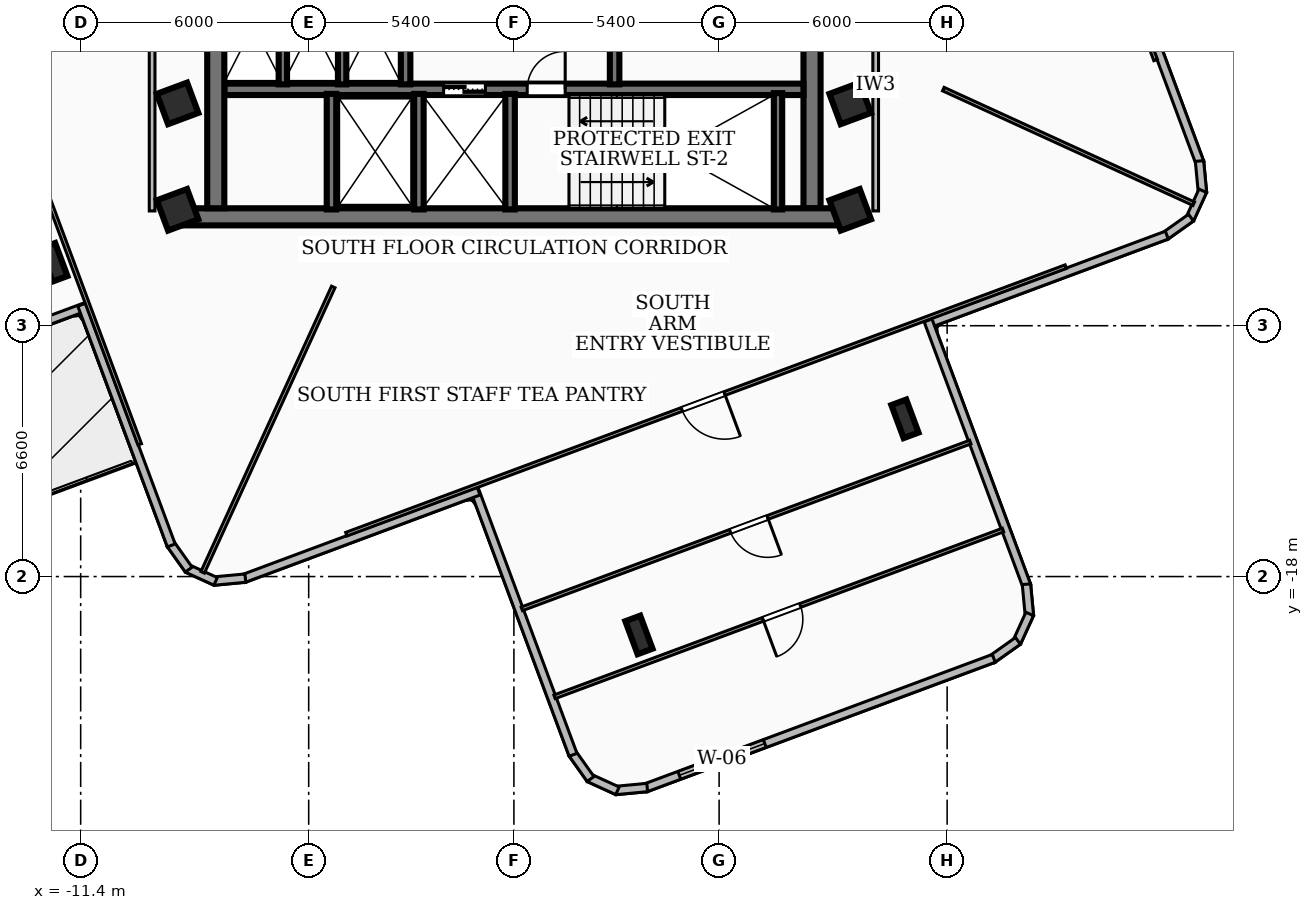
"""IFC4 building model, lengths in metres.
Left out: names, types, materials, properties, quantities, classifications, styles, units other than length and angle.
Written with IfcOpenShell. Run it as: python <this file> out.ifc"""

import sys

from ifc_helpers import new_model, si_unit, direction, frame, frame_2d, origin, origin_2d, place, context, subcontext, project, spatial, rectangle, i_section, extrude, element, fill, save


model = new_model("IFC4")
c1 = context("Model", 3, precision=1e-05, world=origin(), true_north=direction((0.0, 1.0)))
c2 = subcontext(c1, "Body", "Model", "MODEL_VIEW")
j1 = project(units=[si_unit("LENGTHUNIT", "METRE"), si_unit("PLANEANGLEUNIT", "RADIAN")], contexts=[c1])
p1 = place(None, origin())
s1 = spatial("IfcSite", under=j1, at=p1, CompositionType="ELEMENT")
p2 = place(p1, origin())
s2 = spatial("IfcBuilding", under=s1, at=p2, CompositionType="ELEMENT")
p3 = place(p2, frame((0.0, 0.0, 166.68)))
s3 = spatial("IfcBuildingStorey", under=s2, at=p3, CompositionType="ELEMENT", Elevation=166.68)
p4 = place(p3, frame((8.78, -8.535, 0.0), z_axis=(0.0, 0.0, 1.0), x_axis=(-1.0, 0.0, 0.0)))
e1 = element("IfcWall", 1, at=p4, inside=s3, PredefinedType="SHEAR", context=c2, shape_type="SweptSolid", body=[
    extrude(rectangle(XDim=17.56, YDim=0.45, at=frame_2d((8.78, 0.0))), origin(), (0.0, 0.0, 1.0), 3.34),
])
for number, where, z_axis, x_axis in (
    (2, (-7.845, -8.31, 0.0), (0.0, 0.0, 1.0), (0.0, 1.0, 0.0)),
    (3, (7.845, -1.975, 0.0), (0.0, 0.0, 1.0), (0.0, -1.0, 0.0)),
):
    element("IfcWall", number, at=place(p3, frame(where, z_axis=z_axis, x_axis=x_axis)), inside=s3, PredefinedType="SHEAR", context=c2, shape_type="SweptSolid", body=[
        extrude(rectangle(XDim=6.335, YDim=0.45, at=frame_2d((3.167, 0.0))), origin(), (0.0, 0.0, 1.0), 3.34),
    ])
p5 = place(p3, frame((-7.62, -5.18, 0.0), z_axis=(0.0, 0.0, 1.0), x_axis=(1.0, 0.0, 0.0)))
e4 = element("IfcWall", 4, at=p5, inside=s3, PredefinedType="SOLIDWALL", context=c2, shape_type="SweptSolid", body=[
    extrude(rectangle(XDim=15.24, YDim=0.3, at=frame_2d((7.62, 0.0))), origin(), (0.0, 0.0, 1.0), 3.34),
])
p6 = place(p5, frame((5.77, 0.0, 0.0)))
e5 = element("IfcOpeningElement", 5, at=p6, cuts=e4, PredefinedType="OPENING", context=c2, shape_type="SweptSolid", body=[
    extrude(rectangle(XDim=1.1, YDim=2.15, at=frame_2d((0.55, 1.075))), frame((0.0, 0.16, 0.0), z_axis=(0.0, -1.0, 0.0), x_axis=(1.0, 0.0, 0.0)), (0.0, 0.0, 1.0), 0.32),
])
p7 = place(p5, frame((7.97, 0.0, 0.0)))
e6 = element("IfcOpeningElement", 6, at=p7, cuts=e4, PredefinedType="OPENING", context=c2, shape_type="SweptSolid", body=[
    extrude(rectangle(XDim=1.0, YDim=2.1, at=frame_2d((0.5, 1.05))), frame((0.0, 0.16, 0.0), z_axis=(0.0, -1.0, 0.0), x_axis=(1.0, 0.0, 0.0)), (0.0, 0.0, 1.0), 0.32),
])
p8 = place(p3, frame((6.95, -8.34, 0.0), z_axis=(0.0, 0.0, 1.0), x_axis=(0.0, 1.0, 0.0)))
e7 = element("IfcWall", 7, at=p8, inside=s3, PredefinedType="SOLIDWALL", context=c2, shape_type="SweptSolid", body=[
    extrude(rectangle(XDim=3.06, YDim=0.22, at=frame_2d((1.53, 0.0))), origin(), (0.0, 0.0, 1.0), 3.34),
])
for number, where, z_axis, x_axis in (
    (8, (-0.1, -8.34, 0.0), (0.0, 0.0, 1.0), (0.0, 1.0, 0.0)),
    (9, (-2.5, -8.34, 0.0), (0.0, 0.0, 1.0), (0.0, 1.0, 0.0)),
    (10, (-4.8, -8.34, 0.0), (0.0, 0.0, 1.0), (0.0, 1.0, 0.0)),
):
    element("IfcWall", number, at=place(p3, frame(where, z_axis=z_axis, x_axis=x_axis)), inside=s3, PredefinedType="SOLIDWALL", context=c2, shape_type="SweptSolid", body=[
        extrude(rectangle(XDim=3.04, YDim=0.25, at=frame_2d((1.52, 0.0))), origin(), (0.0, 0.0, 1.0), 3.34),
    ])
for number, where, z_axis, x_axis in (
    (11, (-2.85, -5.05, 0.0), (0.0, 0.0, 1.0), (0.0, 1.0, 0.0)),
    (12, (2.65, -5.05, 0.0), (0.0, 0.0, 1.0), (0.0, 1.0, 0.0)),
):
    element("IfcWall", number, at=place(p3, frame(where, z_axis=z_axis, x_axis=x_axis)), inside=s3, PredefinedType="SOLIDWALL", context=c2, shape_type="SweptSolid", body=[
        extrude(rectangle(XDim=3.07, YDim=0.25, at=frame_2d((1.535, 0.0))), origin(), (0.0, 0.0, 1.0), 3.34),
    ])
for number, where, z_axis, x_axis in (
    (13, (-6.08, -5.05, 0.0), (0.0, 0.0, 1.0), (0.0, 1.0, 0.0)),
    (14, (-4.52, -5.05, 0.0), (0.0, 0.0, 1.0), (0.0, 1.0, 0.0)),
):
    element("IfcWall", number, at=place(p3, frame(where, z_axis=z_axis, x_axis=x_axis)), inside=s3, PredefinedType="SOLIDWALL", context=c2, shape_type="SweptSolid", body=[
        extrude(rectangle(XDim=3.07, YDim=0.22, at=frame_2d((1.535, 0.0))), origin(), (0.0, 0.0, 1.0), 3.34),
    ])
for number, where, z_axis, x_axis in (
    (15, (-8.85, -5.55, 0.0), (0.0, 0.0, 1.0), (0.937, 0.349, 0.0)),
    (16, (8.85, -5.55, 0.0), (0.0, 0.0, 1.0), (0.937, 0.349, 0.0)),
    (17, (8.85, -8.35, 0.0), (0.0, 0.0, 1.0), (0.937, 0.349, 0.0)),
    (18, (-8.85, -8.35, 0.0), (0.0, 0.0, 1.0), (0.937, 0.349, 0.0)),
):
    element("IfcColumn", number, at=place(p3, frame(where, z_axis=z_axis, x_axis=x_axis)), inside=s3, PredefinedType="COLUMN", context=c2, shape_type="SweptSolid", body=[
        extrude(rectangle(XDim=0.85, YDim=0.85, at=origin_2d()), origin(), (0.0, 0.0, 1.0), 3.6),
    ])
for number, where, z_axis, x_axis in (
    (19, (-12.106, -9.731, 0.0), (0.0, 0.0, 1.0), (0.937, 0.349, 0.0)),
    (20, (3.29, -19.536, 0.0), (0.0, 0.0, 1.0), (0.937, 0.349, 0.0)),
    (21, (10.29, -13.85, 0.0), (0.0, 0.0, 1.0), (0.937, 0.349, 0.0)),
):
    element("IfcColumn", number, at=place(p3, frame(where, z_axis=z_axis, x_axis=x_axis)), inside=s3, PredefinedType="COLUMN", context=c2, shape_type="SweptSolid", body=[
        extrude(i_section(OverallWidth=0.418, OverallDepth=0.927, WebThickness=0.019, FlangeThickness=0.032, at=origin_2d()), origin(), (0.0, 0.0, 1.0), 3.6),
    ])
p9 = place(p3, frame((-11.26, -10.898, 0.0), z_axis=(0.0, 0.0, 1.0), x_axis=(-0.937248687931, -0.348661579431, 0.0)))
e22 = element("IfcWall", 22, at=p9, inside=s3, PredefinedType="SOLIDWALL", context=c2, shape_type="SweptSolid", body=[
    extrude(rectangle(XDim=9.057, YDim=0.22, at=frame_2d((4.529, 0.0))), origin(), (0.0, 0.0, 1.0), 2.72),
])
p10 = place(p9, frame((4.4, 0.0, 0.0)))
e23 = element("IfcOpeningElement", 23, at=p10, cuts=e22, PredefinedType="OPENING", context=c2, shape_type="SweptSolid", body=[
    extrude(rectangle(XDim=1.1, YDim=2.1, at=frame_2d((0.55, 1.05))), frame((0.0, 0.12, 0.0), z_axis=(0.0, -1.0, 0.0), x_axis=(1.0, 0.0, 0.0)), (0.0, 0.0, 1.0), 0.24),
])
p11 = place(p3, frame((15.751, -0.93, 0.0), z_axis=(0.0, 0.0, 1.0), x_axis=(0.348729932868, -0.937223257246, 0.0)))
e24 = element("IfcWall", 24, at=p11, inside=s3, PredefinedType="SOLIDWALL", context=c2, shape_type="SweptSolid", body=[
    extrude(rectangle(XDim=6.598, YDim=0.22, at=frame_2d((3.299, 0.0))), origin(), (0.0, 0.0, 1.0), 3.34),
])
p12 = place(p3, frame((18.041, -7.066, 0.0), z_axis=(0.0, 0.0, 1.0), x_axis=(0.09330446586, -0.995637623159, 0.0)))
e25 = element("IfcWall", 25, at=p12, inside=s3, PredefinedType="SOLIDWALL", context=c2, shape_type="SweptSolid", body=[
    extrude(rectangle(XDim=0.835, YDim=0.22, at=frame_2d((0.417, 0.0))), origin(), (0.0, 0.0, 1.0), 3.34),
])
p13 = place(p3, frame((18.127, -7.849, 0.0), z_axis=(0.0, 0.0, 1.0), x_axis=(-0.415083126143, -0.909783489843, 0.0)))
e26 = element("IfcWall", 26, at=p13, inside=s3, PredefinedType="SOLIDWALL", context=c2, shape_type="SweptSolid", body=[
    extrude(rectangle(XDim=0.819, YDim=0.22, at=frame_2d((0.409, 0.0))), origin(), (0.0, 0.0, 1.0), 3.34),
])
p14 = place(p3, frame((17.817, -8.557, 0.0), z_axis=(0.0, 0.0, 1.0), x_axis=(-0.815315167698, -0.579017424022, 0.0)))
e27 = element("IfcWall", 27, at=p14, inside=s3, PredefinedType="SOLIDWALL", context=c2, shape_type="SweptSolid", body=[
    extrude(rectangle(XDim=0.833, YDim=0.22, at=frame_2d((0.417, 0.0))), origin(), (0.0, 0.0, 1.0), 3.34),
])
p15 = place(p3, frame((17.181, -9.016, 0.0), z_axis=(0.0, 0.0, 1.0), x_axis=(-0.937216908499, -0.34874699486, 0.0)))
e28 = element("IfcWall", 28, at=p15, inside=s3, PredefinedType="SOLIDWALL", context=c2, shape_type="SweptSolid", body=[
    extrude(rectangle(XDim=6.758, YDim=0.22, at=frame_2d((3.379, 0.0))), origin(), (0.0, 0.0, 1.0), 3.34),
])
p16 = place(p3, frame((10.898, -11.26, 0.0), z_axis=(0.0, 0.0, 1.0), x_axis=(0.348636078187, -0.937258174137, 0.0)))
e29 = element("IfcWall", 29, at=p16, inside=s3, PredefinedType="SOLIDWALL", context=c2, shape_type="SweptSolid", body=[
    extrude(rectangle(XDim=7.458, YDim=0.22, at=frame_2d((3.729, 0.0))), origin(), (0.0, 0.0, 1.0), 3.34),
])
p17 = place(p3, frame((13.487, -18.202, 0.0), z_axis=(0.0, 0.0, 1.0), x_axis=(0.093413278521, -0.99562741997, 0.0)))
e30 = element("IfcWall", 30, at=p17, inside=s3, PredefinedType="SOLIDWALL", context=c2, shape_type="SweptSolid", body=[
    extrude(rectangle(XDim=0.834, YDim=0.22, at=frame_2d((0.417, 0.0))), origin(), (0.0, 0.0, 1.0), 3.34),
])
p18 = place(p3, frame((13.573, -18.984, 0.0), z_axis=(0.0, 0.0, 1.0), x_axis=(-0.41476734413, -0.909927497245, 0.0)))
e31 = element("IfcWall", 31, at=p18, inside=s3, PredefinedType="SOLIDWALL", context=c2, shape_type="SweptSolid", body=[
    extrude(rectangle(XDim=0.82, YDim=0.22, at=frame_2d((0.41, 0.0))), origin(), (0.0, 0.0, 1.0), 3.34),
])
p19 = place(p3, frame((13.263, -19.693, 0.0), z_axis=(0.0, 0.0, 1.0), x_axis=(-0.815453569677, -0.578822490666, 0.0)))
e32 = element("IfcWall", 32, at=p19, inside=s3, PredefinedType="SOLIDWALL", context=c2, shape_type="SweptSolid", body=[
    extrude(rectangle(XDim=0.833, YDim=0.22, at=frame_2d((0.416, 0.0))), origin(), (0.0, 0.0, 1.0), 3.34),
])
p20 = place(p3, frame((12.627, -20.152, 0.0), z_axis=(0.0, 0.0, 1.0), x_axis=(-0.937257326037, -0.348638358175, 0.0)))
e33 = element("IfcWall", 33, at=p20, inside=s3, PredefinedType="SOLIDWALL", context=c2, shape_type="SweptSolid", body=[
    extrude(rectangle(XDim=9.781, YDim=0.22, at=frame_2d((4.89, 0.0))), origin(), (0.0, 0.0, 1.0), 3.34),
])
p21 = place(p20, frame((6.429, 0.0, 0.85)))
e34 = element("IfcOpeningElement", 34, at=p21, cuts=e33, PredefinedType="OPENING", context=c2, shape_type="SweptSolid", body=[
    extrude(rectangle(XDim=2.4, YDim=1.85, at=frame_2d((1.2, 0.925))), frame((0.0, 0.12, 0.0), z_axis=(0.0, -1.0, 0.0), x_axis=(1.0, 0.0, 0.0)), (0.0, 0.0, 1.0), 0.24),
])
p22 = place(p3, frame((3.508, -23.551, 0.0), z_axis=(0.0, 0.0, 1.0), x_axis=(-0.995637623159, -0.09330446586, 0.0)))
e35 = element("IfcWall", 35, at=p22, inside=s3, PredefinedType="SOLIDWALL", context=c2, shape_type="SweptSolid", body=[
    extrude(rectangle(XDim=0.835, YDim=0.22, at=frame_2d((0.417, 0.0))), origin(), (0.0, 0.0, 1.0), 3.34),
])
p23 = place(p3, frame((2.725, -23.637, 0.0), z_axis=(0.0, 0.0, 1.0), x_axis=(-0.909834845619, 0.414970545577, 0.0)))
e36 = element("IfcWall", 36, at=p23, inside=s3, PredefinedType="SOLIDWALL", context=c2, shape_type="SweptSolid", body=[
    extrude(rectangle(XDim=0.819, YDim=0.22, at=frame_2d((0.409, 0.0))), origin(), (0.0, 0.0, 1.0), 3.34),
])
p24 = place(p3, frame((2.017, -23.327, 0.0), z_axis=(0.0, 0.0, 1.0), x_axis=(-0.579242960811, 0.815154949903, 0.0)))
e37 = element("IfcWall", 37, at=p24, inside=s3, PredefinedType="SOLIDWALL", context=c2, shape_type="SweptSolid", body=[
    extrude(rectangle(XDim=0.834, YDim=0.22, at=frame_2d((0.417, 0.0))), origin(), (0.0, 0.0, 1.0), 3.34),
])
p25 = place(p3, frame((1.557, -22.69, 0.0), z_axis=(0.0, 0.0, 1.0), x_axis=(-0.348607320852, 0.937268870628, 0.0)))
e38 = element("IfcWall", 38, at=p25, inside=s3, PredefinedType="SOLIDWALL", context=c2, shape_type="SweptSolid", body=[
    extrude(rectangle(XDim=7.458, YDim=0.22, at=frame_2d((3.729, 0.0))), origin(), (0.0, 0.0, 1.0), 2.644),
])
p26 = place(p3, frame((-0.93, -15.751, 0.0), z_axis=(0.0, 0.0, 1.0), x_axis=(-0.937223257246, -0.348729932868, 0.0)))
e39 = element("IfcWall", 39, at=p26, inside=s3, PredefinedType="SOLIDWALL", context=c2, shape_type="SweptSolid", body=[
    extrude(rectangle(XDim=6.598, YDim=0.22, at=frame_2d((3.299, 0.0))), origin(), (0.0, 0.0, 1.0), 2.644),
])
p27 = place(p3, frame((-7.066, -18.041, 0.0), z_axis=(0.0, 0.0, 1.0), x_axis=(-0.995637623159, -0.09330446586, 0.0)))
e40 = element("IfcWall", 40, at=p27, inside=s3, PredefinedType="SOLIDWALL", context=c2, shape_type="SweptSolid", body=[
    extrude(rectangle(XDim=0.835, YDim=0.22, at=frame_2d((0.417, 0.0))), origin(), (0.0, 0.0, 1.0), 3.34),
])
p28 = place(p3, frame((-7.849, -18.127, 0.0), z_axis=(0.0, 0.0, 1.0), x_axis=(-0.909783489843, 0.415083126143, 0.0)))
e41 = element("IfcWall", 41, at=p28, inside=s3, PredefinedType="SOLIDWALL", context=c2, shape_type="SweptSolid", body=[
    extrude(rectangle(XDim=0.819, YDim=0.22, at=frame_2d((0.409, 0.0))), origin(), (0.0, 0.0, 1.0), 3.34),
])
p29 = place(p3, frame((-8.557, -17.817, 0.0), z_axis=(0.0, 0.0, 1.0), x_axis=(-0.579017424022, 0.815315167698, 0.0)))
e42 = element("IfcWall", 42, at=p29, inside=s3, PredefinedType="SOLIDWALL", context=c2, shape_type="SweptSolid", body=[
    extrude(rectangle(XDim=0.833, YDim=0.22, at=frame_2d((0.417, 0.0))), origin(), (0.0, 0.0, 1.0), 3.34),
])
p30 = place(p3, frame((-9.016, -17.181, 0.0), z_axis=(0.0, 0.0, 1.0), x_axis=(-0.34874699486, 0.937216908499, 0.0)))
e43 = element("IfcWall", 43, at=p30, inside=s3, PredefinedType="SOLIDWALL", context=c2, shape_type="SweptSolid", body=[
    extrude(rectangle(XDim=6.758, YDim=0.22, at=frame_2d((3.379, 0.0))), origin(), (0.0, 0.0, 1.0), 2.72),
])
p31 = place(p3, frame((-9.52, -8.38, 0.0), z_axis=(0.0, 0.0, 1.0), x_axis=(0.0, 1.0, 0.0)))
e44 = element("IfcWall", 44, at=p31, inside=s3, PredefinedType="PARTITIONING", context=c2, shape_type="SweptSolid", body=[
    extrude(rectangle(XDim=6.63, YDim=0.15, at=frame_2d((3.315, 0.0))), origin(), (0.0, 0.0, 1.0), 2.644),
])
p32 = place(p3, frame((9.52, -8.38, 0.0), z_axis=(0.0, 0.0, 1.0), x_axis=(0.0, 1.0, 0.0)))
e45 = element("IfcWall", 45, at=p32, inside=s3, PredefinedType="PARTITIONING", context=c2, shape_type="SweptSolid", body=[
    extrude(rectangle(XDim=6.63, YDim=0.15, at=frame_2d((3.315, 0.0))), origin(), (0.0, 0.0, 1.0), 3.34),
])
p33 = place(p3, frame((-4.753, -10.38, 0.0), z_axis=(0.0, 0.0, 1.0), x_axis=(-0.416191484634, -0.909276991966, 0.0)))
e46 = element("IfcWall", 46, at=p33, inside=s3, PredefinedType="PARTITIONING", context=c2, shape_type="SweptSolid", body=[
    extrude(rectangle(XDim=8.258, YDim=0.1, at=frame_2d((4.129, 0.0))), origin(), (0.0, 0.0, 1.0), 2.644),
])
p34 = place(p3, frame((11.3, -5.174, 0.0), z_axis=(0.0, 0.0, 1.0), x_axis=(0.909275268701, -0.416195249528, 0.0)))
e47 = element("IfcWall", 47, at=p34, inside=s3, PredefinedType="PARTITIONING", context=c2, shape_type="SweptSolid", body=[
    extrude(rectangle(XDim=7.246, YDim=0.1, at=frame_2d((3.623, 0.0))), origin(), (0.0, 0.0, 1.0), 3.34),
])
p35 = place(p3, frame((9.846, 14.522, 0.0), z_axis=(0.0, 0.0, 1.0), x_axis=(0.348543090668, -0.937292757866, 0.0)))
e48 = element("IfcWall", 48, at=p35, inside=s3, PredefinedType="PARTITIONING", context=c2, shape_type="SweptSolid", body=[
    extrude(rectangle(XDim=20.198, YDim=0.1, at=frame_2d((10.099, 0.0))), origin(), (0.0, 0.0, 1.0), 2.644),
])
p36 = place(p35, frame((9.579, 0.0, 0.0)))
e49 = element("IfcOpeningElement", 49, at=p36, cuts=e48, PredefinedType="OPENING", context=c2, shape_type="SweptSolid", body=[
    extrude(rectangle(XDim=1.2, YDim=2.1, at=frame_2d((0.6, 1.05))), frame((0.0, 0.06, 0.0), z_axis=(0.0, -1.0, 0.0), x_axis=(1.0, 0.0, 0.0)), (0.0, 0.0, 1.0), 0.12),
])
p37 = place(p3, frame((-9.846, -14.522, 0.0), z_axis=(0.0, 0.0, 1.0), x_axis=(-0.348543090668, 0.937292757866, 0.0)))
e50 = element("IfcWall", 50, at=p37, inside=s3, PredefinedType="PARTITIONING", context=c2, shape_type="SweptSolid", body=[
    extrude(rectangle(XDim=20.198, YDim=0.1, at=frame_2d((10.099, 0.0))), origin(), (0.0, 0.0, 1.0), 2.644),
])
p38 = place(p37, frame((9.579, 0.0, 0.0)))
e51 = element("IfcOpeningElement", 51, at=p38, cuts=e50, PredefinedType="OPENING", context=c2, shape_type="SweptSolid", body=[
    extrude(rectangle(XDim=1.2, YDim=2.1, at=frame_2d((0.6, 1.05))), frame((0.0, 0.06, 0.0), z_axis=(0.0, -1.0, 0.0), x_axis=(1.0, 0.0, 0.0)), (0.0, 0.0, 1.0), 0.12),
])
p39 = place(p3, frame((14.522, -9.846, 0.0), z_axis=(0.0, 0.0, 1.0), x_axis=(-0.937292757866, -0.348543090668, 0.0)))
e52 = element("IfcWall", 52, at=p39, inside=s3, PredefinedType="PARTITIONING", context=c2, shape_type="SweptSolid", body=[
    extrude(rectangle(XDim=20.198, YDim=0.1, at=frame_2d((10.099, 0.0))), origin(), (0.0, 0.0, 1.0), 2.644),
])
p40 = place(p39, frame((9.579, 0.0, 0.0)))
e53 = element("IfcOpeningElement", 53, at=p40, cuts=e52, PredefinedType="OPENING", context=c2, shape_type="SweptSolid", body=[
    extrude(rectangle(XDim=1.2, YDim=2.1, at=frame_2d((0.6, 1.05))), frame((0.0, 0.06, 0.0), z_axis=(0.0, -1.0, 0.0), x_axis=(1.0, 0.0, 0.0)), (0.0, 0.0, 1.0), 0.12),
])
p41 = place(p3, frame((12.009, -14.461, 0.0), z_axis=(0.0, 0.0, 1.0), x_axis=(-0.937262231235, -0.348625171066, 0.0)))
e54 = element("IfcWall", 54, at=p41, inside=s3, PredefinedType="PARTITIONING", context=c2, shape_type="SweptSolid", body=[
    extrude(rectangle(XDim=12.59, YDim=0.1, at=frame_2d((6.295, 0.0))), origin(), (0.0, 0.0, 1.0), 2.644),
])
p42 = place(p41, frame((5.69, 0.0, 0.0)))
e55 = element("IfcOpeningElement", 55, at=p42, cuts=e54, PredefinedType="OPENING", context=c2, shape_type="SweptSolid", body=[
    extrude(rectangle(XDim=1.05, YDim=2.08, at=frame_2d((0.525, 1.04))), frame((0.0, 0.06, 0.0), z_axis=(0.0, -1.0, 0.0), x_axis=(1.0, 0.0, 0.0)), (0.0, 0.0, 1.0), 0.12),
])
p43 = place(p3, frame((12.87, -16.776, 0.0), z_axis=(0.0, 0.0, 1.0), x_axis=(-0.937262231235, -0.348625171066, 0.0)))
e56 = element("IfcWall", 56, at=p43, inside=s3, PredefinedType="PARTITIONING", context=c2, shape_type="SweptSolid", body=[
    extrude(rectangle(XDim=12.59, YDim=0.1, at=frame_2d((6.295, 0.0))), origin(), (0.0, 0.0, 1.0), 3.34),
])
p44 = place(p43, frame((5.69, 0.0, 0.0)))
e57 = element("IfcOpeningElement", 57, at=p44, cuts=e56, PredefinedType="OPENING", context=c2, shape_type="SweptSolid", body=[
    extrude(rectangle(XDim=1.05, YDim=2.08, at=frame_2d((0.525, 1.04))), frame((0.0, 0.06, 0.0), z_axis=(0.0, -1.0, 0.0), x_axis=(1.0, 0.0, 0.0)), (0.0, 0.0, 1.0), 0.12),
])
p45 = place(p21, origin())
e58 = element("IfcWindow", 58, at=p45, inside=s3, PartitioningType="SINGLE_PANEL", PredefinedType="WINDOW", context=c2, shape_type="SweptSolid", body=[
    extrude(rectangle(XDim=2.4, YDim=1.85, at=frame_2d((1.2, 0.925))), frame((0.0, 0.03, 0.0), z_axis=(0.0, -1.0, 0.0), x_axis=(1.0, 0.0, 0.0)), (0.0, 0.0, 1.0), 0.06),
])
fill(e34, e58)
p46 = place(p6, origin())
e59 = element("IfcDoor", 59, at=p46, inside=s3, OperationType="DOUBLE_DOOR_SLIDING", PredefinedType="DOOR", context=c2, shape_type="SweptSolid", body=[
    extrude(rectangle(XDim=1.1, YDim=2.15, at=frame_2d((0.55, 1.075))), frame((0.0, 0.025, 0.0), z_axis=(0.0, -1.0, 0.0), x_axis=(1.0, 0.0, 0.0)), (0.0, 0.0, 1.0), 0.05),
])
fill(e5, e59)
p47 = place(p7, origin())
e60 = element("IfcDoor", 60, at=p47, inside=s3, OperationType="SINGLE_SWING_RIGHT", PredefinedType="DOOR", context=c2, shape_type="SweptSolid", body=[
    extrude(rectangle(XDim=1.0, YDim=2.1, at=frame_2d((0.5, 1.05))), frame((0.0, 0.025, 0.0), z_axis=(0.0, -1.0, 0.0), x_axis=(1.0, 0.0, 0.0)), (0.0, 0.0, 1.0), 0.05),
])
fill(e6, e60)
p48 = place(p40, origin())
e61 = element("IfcDoor", 61, at=p48, inside=s3, OperationType="SINGLE_SWING_LEFT", PredefinedType="DOOR", context=c2, shape_type="SweptSolid", body=[
    extrude(rectangle(XDim=1.2, YDim=2.1, at=frame_2d((0.6, 1.05))), frame((0.0, 0.025, 0.0), z_axis=(0.0, -1.0, 0.0), x_axis=(1.0, 0.0, 0.0)), (0.0, 0.0, 1.0), 0.05),
])
fill(e53, e61)
p49 = place(p42, origin())
e62 = element("IfcDoor", 62, at=p49, inside=s3, OperationType="SINGLE_SWING_LEFT", PredefinedType="DOOR", context=c2, shape_type="SweptSolid", body=[
    extrude(rectangle(XDim=1.05, YDim=2.08, at=frame_2d((0.525, 1.04))), frame((0.0, 0.025, 0.0), z_axis=(0.0, -1.0, 0.0), x_axis=(1.0, 0.0, 0.0)), (0.0, 0.0, 1.0), 0.05),
])
fill(e55, e62)
p50 = place(p44, origin())
e63 = element("IfcDoor", 63, at=p50, inside=s3, OperationType="SINGLE_SWING_RIGHT", PredefinedType="DOOR", context=c2, shape_type="SweptSolid", body=[
    extrude(rectangle(XDim=1.05, YDim=2.08, at=frame_2d((0.525, 1.04))), frame((0.0, 0.025, 0.0), z_axis=(0.0, -1.0, 0.0), x_axis=(1.0, 0.0, 0.0)), (0.0, 0.0, 1.0), 0.05),
])
fill(e57, e63)
save(model, sys.argv[1])
